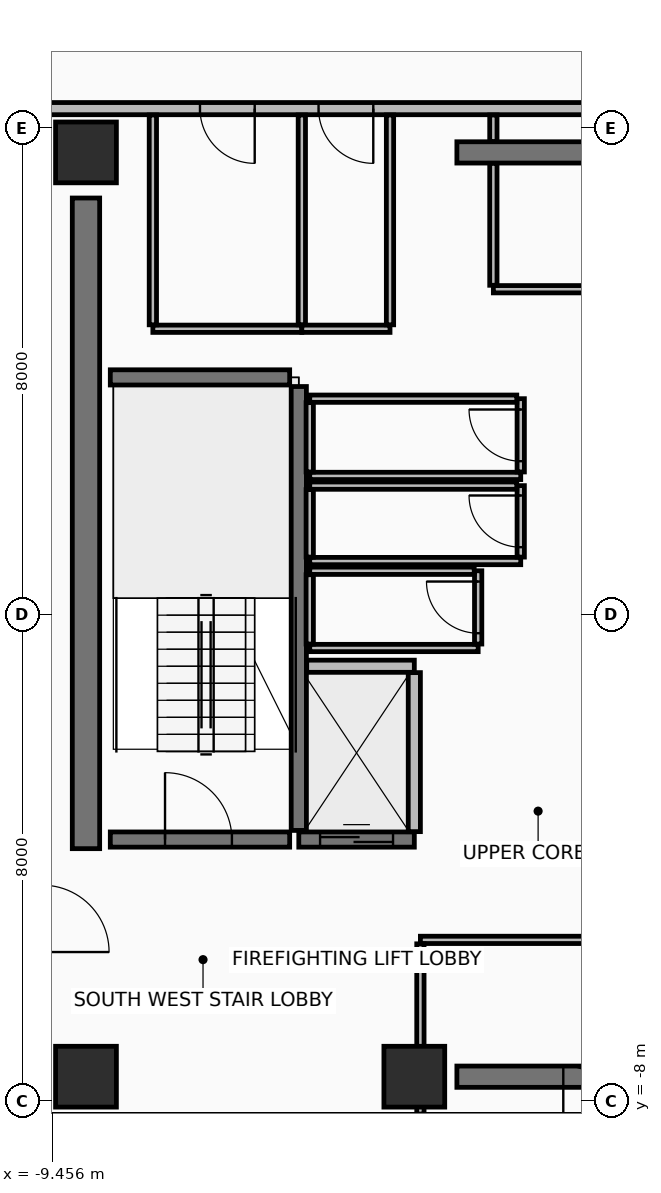
"""IFC4 building model, lengths in metres.
Left out: names, types, materials, properties, quantities, classifications, styles, units other than length and angle.
Written with IfcOpenShell. Run it as: python <this file> out.ifc"""

import sys

from ifc_helpers import new_model, si_unit, direction, frame, frame_2d, origin, origin_2d, place, context, subcontext, project, spatial, rectangle, extrude, element, fill, save


model = new_model("IFC4")
c1 = context("Model", 3, precision=1e-05, world=origin(), true_north=direction((0.0, 1.0)))
c2 = subcontext(c1, "Body", "Model", "MODEL_VIEW")
j1 = project(units=[si_unit("LENGTHUNIT", "METRE"), si_unit("PLANEANGLEUNIT", "RADIAN")], contexts=[c1])
p1 = place(None, origin())
s1 = spatial("IfcSite", under=j1, at=p1, CompositionType="ELEMENT")
p2 = place(p1, origin())
s2 = spatial("IfcBuilding", under=s1, at=p2, CompositionType="ELEMENT")
p3 = place(p2, frame((0.0, 0.0, 253.4)))
s3 = spatial("IfcBuildingStorey", under=s2, at=p3, CompositionType="ELEMENT", Elevation=253.4)
for number, where, z_axis, x_axis in (
    (1, (-8.9, -7.6, 0.0), (0.0, 0.0, 1.0), (1.0, 0.0, 0.0)),
    (2, (-3.5, -7.6, 0.0), (0.0, 0.0, 1.0), (1.0, 0.0, 0.0)),
    (3, (-8.9, 7.6, 0.0), (0.0, 0.0, 1.0), (1.0, 0.0, 0.0)),
):
    element("IfcColumn", number, at=place(p3, frame(where, z_axis=z_axis, x_axis=x_axis)), inside=s3, PredefinedType="COLUMN", context=c2, shape_type="SweptSolid", body=[
        extrude(rectangle(XDim=1.0, YDim=1.0, at=origin_2d()), origin(), (0.0, 0.0, 1.0), 3.6),
    ])
for number, where, z_axis, x_axis in (
    (4, (-2.8, -7.6, 0.0), (0.0, 0.0, 1.0), (1.0, 0.0, 0.0)),
    (5, (-2.8, 7.6, 0.0), (0.0, 0.0, 1.0), (1.0, 0.0, 0.0)),
):
    element("IfcWall", number, at=place(p3, frame(where, z_axis=z_axis, x_axis=x_axis)), inside=s3, PredefinedType="SHEAR", context=c2, shape_type="SweptSolid", body=[
        extrude(rectangle(XDim=5.38, YDim=0.35, at=frame_2d((2.69, 0.0))), origin(), (0.0, 0.0, 1.0), 3.42),
    ])
p4 = place(p3, frame((-8.9, -3.85, 0.0), z_axis=(0.0, 0.0, 1.0), x_axis=(0.0, 1.0, 0.0)))
e6 = element("IfcWall", 6, at=p4, inside=s3, PredefinedType="SHEAR", context=c2, shape_type="SweptSolid", body=[
    extrude(rectangle(XDim=10.7, YDim=0.45, at=frame_2d((5.35, 0.0))), origin(), (0.0, 0.0, 1.0), 3.42),
])
p5 = place(p3, frame((9.62, 8.32, 0.0), z_axis=(0.0, 0.0, 1.0), x_axis=(-1.0, 0.0, 0.0)))
e7 = element("IfcWall", 7, at=p5, inside=s3, PredefinedType="PARTITIONING", context=c2, shape_type="SweptSolid", body=[
    extrude(rectangle(XDim=19.24, YDim=0.2, at=frame_2d((9.62, 0.0))), origin(), (0.0, 0.0, 1.0), 2.915),
])
p6 = place(p5, frame((8.67, 0.0, 0.0)))
e8 = element("IfcOpeningElement", 8, at=p6, cuts=e7, PredefinedType="OPENING", context=c2, shape_type="SweptSolid", body=[
    extrude(rectangle(XDim=0.9, YDim=2.1, at=frame_2d((0.45, 1.05))), frame((0.0, 0.11, 0.0), z_axis=(0.0, -1.0, 0.0), x_axis=(1.0, 0.0, 0.0)), (0.0, 0.0, 1.0), 0.22),
])
p7 = place(p5, frame((15.745, 0.0, 0.0)))
e9 = element("IfcOpeningElement", 9, at=p7, cuts=e7, PredefinedType="OPENING", context=c2, shape_type="SweptSolid", body=[
    extrude(rectangle(XDim=0.9, YDim=2.1, at=frame_2d((0.45, 1.05))), frame((0.0, 0.11, 0.0), z_axis=(0.0, -1.0, 0.0), x_axis=(1.0, 0.0, 0.0)), (0.0, 0.0, 1.0), 0.22),
])
p8 = place(p5, frame((13.795, 0.0, 0.0)))
e10 = element("IfcOpeningElement", 10, at=p8, cuts=e7, PredefinedType="OPENING", context=c2, shape_type="SweptSolid", body=[
    extrude(rectangle(XDim=0.9, YDim=2.1, at=frame_2d((0.45, 1.05))), frame((0.0, 0.11, 0.0), z_axis=(0.0, -1.0, 0.0), x_axis=(1.0, 0.0, 0.0)), (0.0, 0.0, 1.0), 0.22),
])
p9 = place(p3, frame((-5.4, -3.55, 0.0), z_axis=(0.0, 0.0, 1.0), x_axis=(0.0, 1.0, 0.0)))
e11 = element("IfcWall", 11, at=p9, inside=s3, PredefinedType="SHEAR", context=c2, shape_type="SweptSolid", body=[
    extrude(rectangle(XDim=7.3, YDim=0.25, at=frame_2d((3.65, 0.0))), origin(), (0.0, 0.0, 1.0), 3.42),
])
p10 = place(p3, frame((-8.5, -3.7, 0.0), z_axis=(0.0, 0.0, 1.0), x_axis=(1.0, 0.0, 0.0)))
e12 = element("IfcWall", 12, at=p10, inside=s3, PredefinedType="SHEAR", context=c2, shape_type="SweptSolid", body=[
    extrude(rectangle(XDim=2.95, YDim=0.25, at=frame_2d((1.475, 0.0))), origin(), (0.0, 0.0, 1.0), 3.42),
])
p11 = place(p10, frame((0.9, 0.0, 0.0)))
e13 = element("IfcOpeningElement", 13, at=p11, cuts=e12, PredefinedType="OPENING", context=c2, shape_type="SweptSolid", body=[
    extrude(rectangle(XDim=1.1, YDim=2.15, at=frame_2d((0.55, 1.075))), frame((0.0, 0.135, 0.0), z_axis=(0.0, -1.0, 0.0), x_axis=(1.0, 0.0, 0.0)), (0.0, 0.0, 1.0), 0.27),
])
p12 = place(p3, frame((-8.5, 3.9, 0.0), z_axis=(0.0, 0.0, 1.0), x_axis=(1.0, 0.0, 0.0)))
e14 = element("IfcWall", 14, at=p12, inside=s3, PredefinedType="SHEAR", context=c2, shape_type="SweptSolid", body=[
    extrude(rectangle(XDim=2.95, YDim=0.25, at=frame_2d((1.475, 0.0))), origin(), (0.0, 0.0, 1.0), 3.42),
])
p13 = place(p3, frame((-5.4, -3.7, 0.0), z_axis=(0.0, 0.0, 1.0), x_axis=(1.0, 0.0, 0.0)))
e15 = element("IfcWall", 15, at=p13, inside=s3, PredefinedType="SHEAR", context=c2, shape_type="SweptSolid", body=[
    extrude(rectangle(XDim=1.9, YDim=0.25, at=frame_2d((0.95, 0.0))), origin(), (0.0, 0.0, 1.0), 3.42),
])
p14 = place(p13, frame((0.35, 0.0, 0.0)))
e16 = element("IfcOpeningElement", 16, at=p14, cuts=e15, PredefinedType="OPENING", context=c2, shape_type="SweptSolid", body=[
    extrude(rectangle(XDim=1.2, YDim=2.2, at=frame_2d((0.6, 1.1))), frame((0.0, 0.135, 0.0), z_axis=(0.0, -1.0, 0.0), x_axis=(1.0, 0.0, 0.0)), (0.0, 0.0, 1.0), 0.27),
])
p15 = place(p3, frame((-5.27, -0.85, 0.0), z_axis=(0.0, 0.0, 1.0), x_axis=(1.0, 0.0, 0.0)))
e17 = element("IfcWall", 17, at=p15, inside=s3, PredefinedType="PARTITIONING", context=c2, shape_type="SweptSolid", body=[
    extrude(rectangle(XDim=1.77, YDim=0.2, at=frame_2d((0.885, 0.0))), origin(), (0.0, 0.0, 1.0), 3.42),
])
p16 = place(p3, frame((-3.5, -3.57, 0.0), z_axis=(0.0, 0.0, 1.0), x_axis=(0.0, 1.0, 0.0)))
e18 = element("IfcWall", 18, at=p16, inside=s3, PredefinedType="PARTITIONING", context=c2, shape_type="SweptSolid", body=[
    extrude(rectangle(XDim=2.615, YDim=0.2, at=frame_2d((1.308, 0.0))), origin(), (0.0, 0.0, 1.0), 3.42),
])
p17 = place(p3, frame((-5.22, 2.28, 0.0), z_axis=(0.0, 0.0, 1.0), x_axis=(1.0, 0.0, 0.0)))
e19 = element("IfcWall", 19, at=p17, inside=s3, PredefinedType="PARTITIONING", context=c2, shape_type="SweptSolid", body=[
    extrude(rectangle(XDim=3.47, YDim=0.12, at=frame_2d((1.735, 0.0))), origin(), (0.0, 0.0, 1.0), 3.42),
])
p18 = place(p3, frame((-1.75, 2.345, 0.0), z_axis=(0.0, 0.0, 1.0), x_axis=(0.0, 1.0, 0.0)))
e20 = element("IfcWall", 20, at=p18, inside=s3, PredefinedType="PARTITIONING", context=c2, shape_type="SweptSolid", body=[
    extrude(rectangle(XDim=1.205, YDim=0.12, at=frame_2d((0.603, 0.0))), origin(), (0.0, 0.0, 1.0), 3.42),
])
p19 = place(p18, frame((0.177, 0.0, 0.0)))
e21 = element("IfcOpeningElement", 21, at=p19, cuts=e20, PredefinedType="OPENING", context=c2, shape_type="SweptSolid", body=[
    extrude(rectangle(XDim=0.85, YDim=2.1, at=frame_2d((0.425, 1.05))), frame((0.0, 0.07, 0.0), z_axis=(0.0, -1.0, 0.0), x_axis=(1.0, 0.0, 0.0)), (0.0, 0.0, 1.0), 0.14),
])
p20 = place(p3, frame((-1.815, 3.55, 0.0), z_axis=(0.0, 0.0, 1.0), x_axis=(-1.0, 0.0, 0.0)))
e22 = element("IfcWall", 22, at=p20, inside=s3, PredefinedType="PARTITIONING", context=c2, shape_type="SweptSolid", body=[
    extrude(rectangle(XDim=3.405, YDim=0.12, at=frame_2d((1.703, 0.0))), origin(), (0.0, 0.0, 1.0), 3.42),
])
p21 = place(p3, frame((-5.22, 3.485, 0.0), z_axis=(0.0, 0.0, 1.0), x_axis=(0.0, -1.0, 0.0)))
e23 = element("IfcWall", 23, at=p21, inside=s3, PredefinedType="PARTITIONING", context=c2, shape_type="SweptSolid", body=[
    extrude(rectangle(XDim=1.14, YDim=0.12, at=frame_2d((0.57, 0.0))), origin(), (0.0, 0.0, 1.0), 3.42),
])
p22 = place(p3, frame((-5.22, 0.88, 0.0), z_axis=(0.0, 0.0, 1.0), x_axis=(1.0, 0.0, 0.0)))
e24 = element("IfcWall", 24, at=p22, inside=s3, PredefinedType="PARTITIONING", context=c2, shape_type="SweptSolid", body=[
    extrude(rectangle(XDim=3.47, YDim=0.12, at=frame_2d((1.735, 0.0))), origin(), (0.0, 0.0, 1.0), 3.42),
])
p23 = place(p3, frame((-1.75, 0.945, 0.0), z_axis=(0.0, 0.0, 1.0), x_axis=(0.0, 1.0, 0.0)))
e25 = element("IfcWall", 25, at=p23, inside=s3, PredefinedType="PARTITIONING", context=c2, shape_type="SweptSolid", body=[
    extrude(rectangle(XDim=1.175, YDim=0.12, at=frame_2d((0.587, 0.0))), origin(), (0.0, 0.0, 1.0), 3.42),
])
p24 = place(p23, frame((0.163, 0.0, 0.0)))
e26 = element("IfcOpeningElement", 26, at=p24, cuts=e25, PredefinedType="OPENING", context=c2, shape_type="SweptSolid", body=[
    extrude(rectangle(XDim=0.85, YDim=2.1, at=frame_2d((0.425, 1.05))), frame((0.0, 0.07, 0.0), z_axis=(0.0, -1.0, 0.0), x_axis=(1.0, 0.0, 0.0)), (0.0, 0.0, 1.0), 0.14),
])
p25 = place(p3, frame((-1.815, 2.12, 0.0), z_axis=(0.0, 0.0, 1.0), x_axis=(-1.0, 0.0, 0.0)))
e27 = element("IfcWall", 27, at=p25, inside=s3, PredefinedType="PARTITIONING", context=c2, shape_type="SweptSolid", body=[
    extrude(rectangle(XDim=3.405, YDim=0.12, at=frame_2d((1.703, 0.0))), origin(), (0.0, 0.0, 1.0), 3.42),
])
p26 = place(p3, frame((-5.22, 2.055, 0.0), z_axis=(0.0, 0.0, 1.0), x_axis=(0.0, -1.0, 0.0)))
e28 = element("IfcWall", 28, at=p26, inside=s3, PredefinedType="PARTITIONING", context=c2, shape_type="SweptSolid", body=[
    extrude(rectangle(XDim=1.11, YDim=0.12, at=frame_2d((0.555, 0.0))), origin(), (0.0, 0.0, 1.0), 3.42),
])
p27 = place(p3, frame((-5.22, -0.55, 0.0), z_axis=(0.0, 0.0, 1.0), x_axis=(1.0, 0.0, 0.0)))
e29 = element("IfcWall", 29, at=p27, inside=s3, PredefinedType="PARTITIONING", context=c2, shape_type="SweptSolid", body=[
    extrude(rectangle(XDim=2.77, YDim=0.12, at=frame_2d((1.385, 0.0))), origin(), (0.0, 0.0, 1.0), 3.42),
])
p28 = place(p3, frame((-2.45, -0.485, 0.0), z_axis=(0.0, 0.0, 1.0), x_axis=(0.0, 1.0, 0.0)))
e30 = element("IfcWall", 30, at=p28, inside=s3, PredefinedType="PARTITIONING", context=c2, shape_type="SweptSolid", body=[
    extrude(rectangle(XDim=1.205, YDim=0.12, at=frame_2d((0.603, 0.0))), origin(), (0.0, 0.0, 1.0), 3.42),
])
p29 = place(p28, frame((0.178, 0.0, 0.0)))
e31 = element("IfcOpeningElement", 31, at=p29, cuts=e30, PredefinedType="OPENING", context=c2, shape_type="SweptSolid", body=[
    extrude(rectangle(XDim=0.85, YDim=2.1, at=frame_2d((0.425, 1.05))), frame((0.0, 0.07, 0.0), z_axis=(0.0, -1.0, 0.0), x_axis=(1.0, 0.0, 0.0)), (0.0, 0.0, 1.0), 0.14),
])
p30 = place(p3, frame((-2.515, 0.72, 0.0), z_axis=(0.0, 0.0, 1.0), x_axis=(-1.0, 0.0, 0.0)))
e32 = element("IfcWall", 32, at=p30, inside=s3, PredefinedType="PARTITIONING", context=c2, shape_type="SweptSolid", body=[
    extrude(rectangle(XDim=2.705, YDim=0.12, at=frame_2d((1.353, 0.0))), origin(), (0.0, 0.0, 1.0), 3.42),
])
p31 = place(p3, frame((-5.22, 0.655, 0.0), z_axis=(0.0, 0.0, 1.0), x_axis=(0.0, -1.0, 0.0)))
e33 = element("IfcWall", 33, at=p31, inside=s3, PredefinedType="PARTITIONING", context=c2, shape_type="SweptSolid", body=[
    extrude(rectangle(XDim=1.14, YDim=0.12, at=frame_2d((0.57, 0.0))), origin(), (0.0, 0.0, 1.0), 3.42),
])
p32 = place(p3, frame((2.135, -5.35, 0.0), z_axis=(0.0, 0.0, 1.0), x_axis=(-1.0, 0.0, 0.0)))
e34 = element("IfcWall", 34, at=p32, inside=s3, PredefinedType="PARTITIONING", context=c2, shape_type="SweptSolid", body=[
    extrude(rectangle(XDim=5.535, YDim=0.12, at=frame_2d((2.768, 0.0))), origin(), (0.0, 0.0, 1.0), 2.715),
])
p33 = place(p3, frame((-3.4, -5.415, 0.0), z_axis=(0.0, 0.0, 1.0), x_axis=(0.0, -1.0, 0.0)))
e35 = element("IfcWall", 35, at=p33, inside=s3, PredefinedType="PARTITIONING", context=c2, shape_type="SweptSolid", body=[
    extrude(rectangle(XDim=2.8, YDim=0.12, at=frame_2d((1.4, 0.0))), origin(), (0.0, 0.0, 1.0), 2.715),
])
p34 = place(p3, frame((-2.2, 5.35, 0.0), z_axis=(0.0, 0.0, 1.0), x_axis=(1.0, 0.0, 0.0)))
e36 = element("IfcWall", 36, at=p34, inside=s3, PredefinedType="PARTITIONING", context=c2, shape_type="SweptSolid", body=[
    extrude(rectangle(XDim=5.4, YDim=0.12, at=frame_2d((2.7, 0.0))), origin(), (0.0, 0.0, 1.0), 2.715),
])
p35 = place(p3, frame((-2.2, 8.215, 0.0), z_axis=(0.0, 0.0, 1.0), x_axis=(0.0, -1.0, 0.0)))
e37 = element("IfcWall", 37, at=p35, inside=s3, PredefinedType="PARTITIONING", context=c2, shape_type="SweptSolid", body=[
    extrude(rectangle(XDim=0.435, YDim=0.12, at=frame_2d((0.218, 0.0))), origin(), (0.0, 0.0, 1.0), 2.715),
])
p36 = place(p3, frame((-2.2, 7.42, 0.0), z_axis=(0.0, 0.0, 1.0), x_axis=(0.0, -1.0, 0.0)))
e38 = element("IfcWall", 38, at=p36, inside=s3, PredefinedType="PARTITIONING", context=c2, shape_type="SweptSolid", body=[
    extrude(rectangle(XDim=2.005, YDim=0.12, at=frame_2d((1.002, 0.0))), origin(), (0.0, 0.0, 1.0), 2.715),
])
p37 = place(p3, frame((-7.8, 4.7, 0.0), z_axis=(0.0, 0.0, 1.0), x_axis=(1.0, 0.0, 0.0)))
e39 = element("IfcWall", 39, at=p37, inside=s3, PredefinedType="PARTITIONING", context=c2, shape_type="SweptSolid", body=[
    extrude(rectangle(XDim=2.45, YDim=0.12, at=frame_2d((1.225, 0.0))), origin(), (0.0, 0.0, 1.0), 3.42),
])
for number, where, z_axis, x_axis in (
    (40, (-5.35, 4.765, 0.0), (0.0, 0.0, 1.0), (0.0, 1.0, 0.0)),
    (41, (-7.8, 8.215, 0.0), (0.0, 0.0, 1.0), (0.0, -1.0, 0.0)),
):
    element("IfcWall", number, at=place(p3, frame(where, z_axis=z_axis, x_axis=x_axis)), inside=s3, PredefinedType="PARTITIONING", context=c2, shape_type="SweptSolid", body=[
        extrude(rectangle(XDim=3.45, YDim=0.12, at=frame_2d((1.725, 0.0))), origin(), (0.0, 0.0, 1.0), 2.715),
    ])
p38 = place(p3, frame((-5.35, 4.7, 0.0), z_axis=(0.0, 0.0, 1.0), x_axis=(1.0, 0.0, 0.0)))
e42 = element("IfcWall", 42, at=p38, inside=s3, PredefinedType="PARTITIONING", context=c2, shape_type="SweptSolid", body=[
    extrude(rectangle(XDim=1.45, YDim=0.12, at=frame_2d((0.725, 0.0))), origin(), (0.0, 0.0, 1.0), 3.42),
])
p39 = place(p3, frame((-3.9, 4.765, 0.0), z_axis=(0.0, 0.0, 1.0), x_axis=(0.0, 1.0, 0.0)))
e43 = element("IfcWall", 43, at=p39, inside=s3, PredefinedType="PARTITIONING", context=c2, shape_type="SweptSolid", body=[
    extrude(rectangle(XDim=3.45, YDim=0.12, at=frame_2d((1.725, 0.0))), origin(), (0.0, 0.0, 1.0), 2.715),
])
p40 = place(p11, origin())
e44 = element("IfcDoor", 44, at=p40, inside=s3, OperationType="SINGLE_SWING_LEFT", PredefinedType="DOOR", context=c2, shape_type="SweptSolid", body=[
    extrude(rectangle(XDim=1.1, YDim=2.15, at=frame_2d((0.55, 1.075))), frame((0.0, 0.025, 0.0), z_axis=(0.0, -1.0, 0.0), x_axis=(1.0, 0.0, 0.0)), (0.0, 0.0, 1.0), 0.05),
])
fill(e13, e44)
p41 = place(p14, origin())
e45 = element("IfcDoor", 45, at=p41, inside=s3, OperationType="SLIDING_TO_RIGHT", PredefinedType="DOOR", context=c2, shape_type="SweptSolid", body=[
    extrude(rectangle(XDim=1.2, YDim=2.2, at=frame_2d((0.6, 1.1))), frame((0.0, 0.025, 0.0), z_axis=(0.0, -1.0, 0.0), x_axis=(1.0, 0.0, 0.0)), (0.0, 0.0, 1.0), 0.05),
])
fill(e16, e45)
p42 = place(p19, frame((0.85, 0.0, 0.0), z_axis=(0.0, 0.0, 1.0), x_axis=(-1.0, 0.0, 0.0)))
e46 = element("IfcDoor", 46, at=p42, inside=s3, OperationType="SINGLE_SWING_RIGHT", PredefinedType="DOOR", context=c2, shape_type="SweptSolid", body=[
    extrude(rectangle(XDim=0.85, YDim=2.1, at=frame_2d((0.425, 1.05))), frame((0.0, 0.025, 0.0), z_axis=(0.0, -1.0, 0.0), x_axis=(1.0, 0.0, 0.0)), (0.0, 0.0, 1.0), 0.05),
])
fill(e21, e46)
p43 = place(p24, frame((0.85, 0.0, 0.0), z_axis=(0.0, 0.0, 1.0), x_axis=(-1.0, 0.0, 0.0)))
e47 = element("IfcDoor", 47, at=p43, inside=s3, OperationType="SINGLE_SWING_RIGHT", PredefinedType="DOOR", context=c2, shape_type="SweptSolid", body=[
    extrude(rectangle(XDim=0.85, YDim=2.1, at=frame_2d((0.425, 1.05))), frame((0.0, 0.025, 0.0), z_axis=(0.0, -1.0, 0.0), x_axis=(1.0, 0.0, 0.0)), (0.0, 0.0, 1.0), 0.05),
])
fill(e26, e47)
p44 = place(p29, frame((0.85, 0.0, 0.0), z_axis=(0.0, 0.0, 1.0), x_axis=(-1.0, 0.0, 0.0)))
e48 = element("IfcDoor", 48, at=p44, inside=s3, OperationType="SINGLE_SWING_RIGHT", PredefinedType="DOOR", context=c2, shape_type="SweptSolid", body=[
    extrude(rectangle(XDim=0.85, YDim=2.1, at=frame_2d((0.425, 1.05))), frame((0.0, 0.025, 0.0), z_axis=(0.0, -1.0, 0.0), x_axis=(1.0, 0.0, 0.0)), (0.0, 0.0, 1.0), 0.05),
])
fill(e31, e48)
p45 = place(p7, origin())
e49 = element("IfcDoor", 49, at=p45, inside=s3, OperationType="SINGLE_SWING_LEFT", PredefinedType="DOOR", context=c2, shape_type="SweptSolid", body=[
    extrude(rectangle(XDim=0.9, YDim=2.1, at=frame_2d((0.45, 1.05))), frame((0.0, 0.025, 0.0), z_axis=(0.0, -1.0, 0.0), x_axis=(1.0, 0.0, 0.0)), (0.0, 0.0, 1.0), 0.05),
])
fill(e9, e49)
p46 = place(p8, origin())
e50 = element("IfcDoor", 50, at=p46, inside=s3, OperationType="SINGLE_SWING_LEFT", PredefinedType="DOOR", context=c2, shape_type="SweptSolid", body=[
    extrude(rectangle(XDim=0.9, YDim=2.1, at=frame_2d((0.45, 1.05))), frame((0.0, 0.025, 0.0), z_axis=(0.0, -1.0, 0.0), x_axis=(1.0, 0.0, 0.0)), (0.0, 0.0, 1.0), 0.05),
])
fill(e10, e50)
save(model, sys.argv[1])
